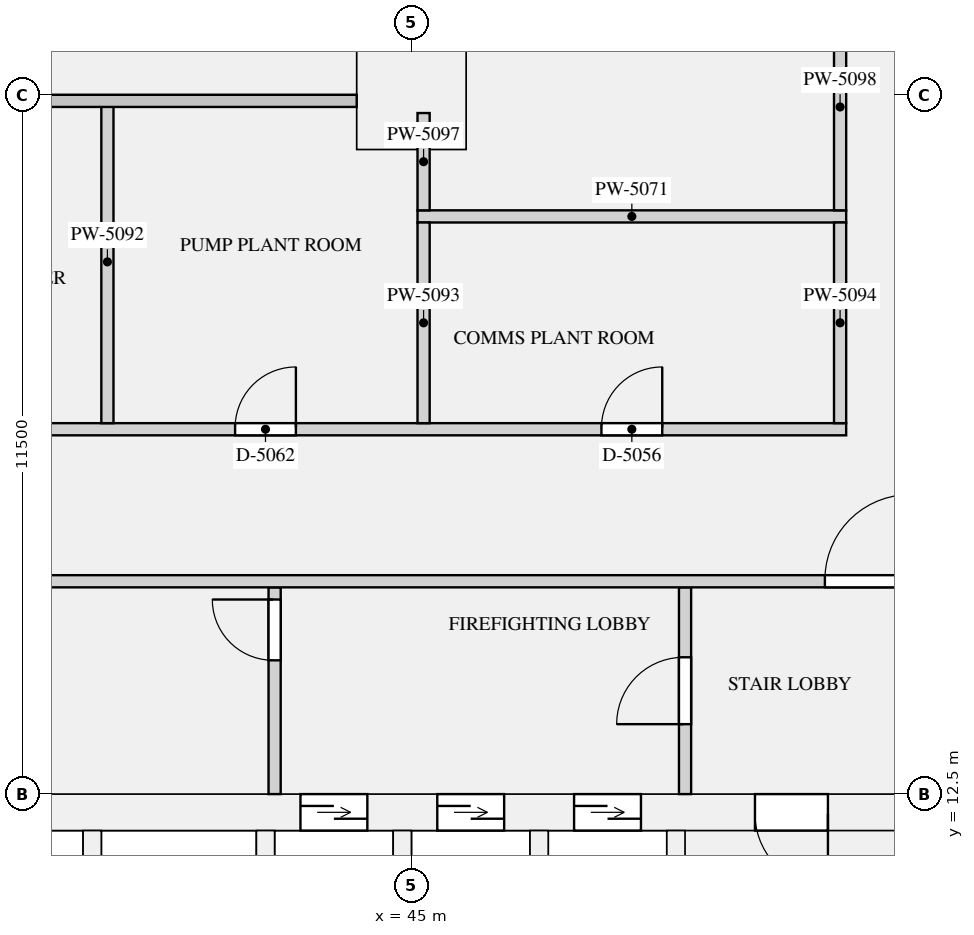
"""IFC4 building model, lengths in metres.
Left out: names, types, materials, properties, quantities, classifications, styles, units other than length and angle.
Written with IfcOpenShell. Run it as: python <this file> out.ifc"""

import sys

from ifc_helpers import new_model, si_unit, direction, frame, frame_2d, origin, origin_2d, place, context, subcontext, project, spatial, rectangle, extrude, element, fill, save


model = new_model("IFC4")
c1 = context("Model", 3, precision=1e-05, world=origin(), true_north=direction((0.0, 1.0)))
c2 = subcontext(c1, "Body", "Model", "MODEL_VIEW")
j1 = project(units=[si_unit("LENGTHUNIT", "METRE"), si_unit("PLANEANGLEUNIT", "RADIAN")], contexts=[c1])
p1 = place(None, origin())
s1 = spatial("IfcSite", under=j1, at=p1, CompositionType="ELEMENT")
p2 = place(p1, origin())
s2 = spatial("IfcBuilding", under=s1, at=p2, CompositionType="ELEMENT")
p3 = place(p2, frame((0.0, 0.0, 15.5)))
s3 = spatial("IfcBuildingStorey", under=s2, at=p3, CompositionType="ELEMENT", Elevation=15.5)
p4 = place(p3, frame((45.0, 24.0, 0.0), z_axis=(0.0, 0.0, 1.0), x_axis=(1.0, 0.0, 0.0)))
e1 = element("IfcColumn", 1, at=p4, inside=s3, PredefinedType="COLUMN", context=c2, shape_type="SweptSolid", body=[
    extrude(rectangle(XDim=1.8, YDim=1.8, at=origin_2d()), origin(), (0.0, 0.0, 1.0), 4.0),
])
p5 = place(p3, frame((19.0, 12.2, 0.0), z_axis=(0.0, 0.0, 1.0), x_axis=(1.0, 0.0, 0.0)))
e2 = element("IfcWall", 2, at=p5, inside=s3, PredefinedType="SHEAR", context=c2, shape_type="SweptSolid", body=[
    extrude(rectangle(XDim=34.0, YDim=0.6, at=frame_2d((17.0, 0.0))), origin(), (0.0, 0.0, 1.0), 4.0),
])
p6 = place(p5, frame((4.475, 0.0, 0.0)))
e3 = element("IfcOpeningElement", 3, at=p6, cuts=e2, PredefinedType="OPENING", context=c2, shape_type="SweptSolid", body=[
    extrude(rectangle(XDim=1.2, YDim=2.1, at=frame_2d((0.6, 1.05))), frame((0.0, 0.31, 0.0), z_axis=(0.0, -1.0, 0.0), x_axis=(1.0, 0.0, 0.0)), (0.0, 0.0, 1.0), 0.62),
])
p7 = place(p5, frame((7.325, 0.0, 0.0)))
e4 = element("IfcOpeningElement", 4, at=p7, cuts=e2, PredefinedType="OPENING", context=c2, shape_type="SweptSolid", body=[
    extrude(rectangle(XDim=1.2, YDim=2.1, at=frame_2d((0.6, 1.05))), frame((0.0, 0.31, 0.0), z_axis=(0.0, -1.0, 0.0), x_axis=(1.0, 0.0, 0.0)), (0.0, 0.0, 1.0), 0.62),
])
p8 = place(p5, frame((10.175, 0.0, 0.0)))
e5 = element("IfcOpeningElement", 5, at=p8, cuts=e2, PredefinedType="OPENING", context=c2, shape_type="SweptSolid", body=[
    extrude(rectangle(XDim=1.2, YDim=2.1, at=frame_2d((0.6, 1.05))), frame((0.0, 0.31, 0.0), z_axis=(0.0, -1.0, 0.0), x_axis=(1.0, 0.0, 0.0)), (0.0, 0.0, 1.0), 0.62),
])
p9 = place(p5, frame((13.025, 0.0, 0.0)))
e6 = element("IfcOpeningElement", 6, at=p9, cuts=e2, PredefinedType="OPENING", context=c2, shape_type="SweptSolid", body=[
    extrude(rectangle(XDim=1.2, YDim=2.1, at=frame_2d((0.6, 1.05))), frame((0.0, 0.31, 0.0), z_axis=(0.0, -1.0, 0.0), x_axis=(1.0, 0.0, 0.0)), (0.0, 0.0, 1.0), 0.62),
])
p10 = place(p5, frame((15.875, 0.0, 0.0)))
e7 = element("IfcOpeningElement", 7, at=p10, cuts=e2, PredefinedType="OPENING", context=c2, shape_type="SweptSolid", body=[
    extrude(rectangle(XDim=1.2, YDim=2.1, at=frame_2d((0.6, 1.05))), frame((0.0, 0.31, 0.0), z_axis=(0.0, -1.0, 0.0), x_axis=(1.0, 0.0, 0.0)), (0.0, 0.0, 1.0), 0.62),
])
p11 = place(p5, frame((24.175, 0.0, 0.0)))
e8 = element("IfcOpeningElement", 8, at=p11, cuts=e2, PredefinedType="OPENING", context=c2, shape_type="SweptSolid", body=[
    extrude(rectangle(XDim=1.1, YDim=2.1, at=frame_2d((0.55, 1.05))), frame((0.0, 0.31, 0.0), z_axis=(0.0, -1.0, 0.0), x_axis=(1.0, 0.0, 0.0)), (0.0, 0.0, 1.0), 0.62),
])
p12 = place(p5, frame((26.425, 0.0, 0.0)))
e9 = element("IfcOpeningElement", 9, at=p12, cuts=e2, PredefinedType="OPENING", context=c2, shape_type="SweptSolid", body=[
    extrude(rectangle(XDim=1.1, YDim=2.1, at=frame_2d((0.55, 1.05))), frame((0.0, 0.31, 0.0), z_axis=(0.0, -1.0, 0.0), x_axis=(1.0, 0.0, 0.0)), (0.0, 0.0, 1.0), 0.62),
])
p13 = place(p5, frame((28.675, 0.0, 0.0)))
e10 = element("IfcOpeningElement", 10, at=p13, cuts=e2, PredefinedType="OPENING", context=c2, shape_type="SweptSolid", body=[
    extrude(rectangle(XDim=1.1, YDim=2.1, at=frame_2d((0.55, 1.05))), frame((0.0, 0.31, 0.0), z_axis=(0.0, -1.0, 0.0), x_axis=(1.0, 0.0, 0.0)), (0.0, 0.0, 1.0), 0.62),
])
p14 = place(p5, frame((1.15, 0.0, 0.0)))
e11 = element("IfcOpeningElement", 11, at=p14, cuts=e2, PredefinedType="OPENING", context=c2, shape_type="SweptSolid", body=[
    extrude(rectangle(XDim=1.2, YDim=2.1, at=frame_2d((0.6, 1.05))), frame((0.0, 0.31, 0.0), z_axis=(0.0, -1.0, 0.0), x_axis=(1.0, 0.0, 0.0)), (0.0, 0.0, 1.0), 0.62),
])
p15 = place(p5, frame((31.65, 0.0, 0.0)))
e12 = element("IfcOpeningElement", 12, at=p15, cuts=e2, PredefinedType="OPENING", context=c2, shape_type="SweptSolid", body=[
    extrude(rectangle(XDim=1.2, YDim=2.1, at=frame_2d((0.6, 1.05))), frame((0.0, 0.31, 0.0), z_axis=(0.0, -1.0, 0.0), x_axis=(1.0, 0.0, 0.0)), (0.0, 0.0, 1.0), 0.62),
])
p16 = place(p3, frame((39.75, 9.35, 0.0), z_axis=(0.0, 0.0, 1.0), x_axis=(0.0, 1.0, 0.0)))
e13 = element("IfcWall", 13, at=p16, inside=s3, PredefinedType="SHEAR", context=c2, shape_type="SweptSolid", body=[
    extrude(rectangle(XDim=2.55, YDim=0.3, at=frame_2d((1.275, 0.0))), origin(), (0.0, 0.0, 1.0), 4.0),
])
for number, where, z_axis, x_axis in (
    (14, (42.6, 8.25, 0.0), (0.0, 0.0, 1.0), (0.0, 1.0, 0.0)),
    (15, (44.85, 8.25, 0.0), (0.0, 0.0, 1.0), (0.0, 1.0, 0.0)),
    (16, (47.1, 8.25, 0.0), (0.0, 0.0, 1.0), (0.0, 1.0, 0.0)),
    (17, (49.35, 8.25, 0.0), (0.0, 0.0, 1.0), (0.0, 1.0, 0.0)),
):
    element("IfcWall", number, at=place(p3, frame(where, z_axis=z_axis, x_axis=x_axis)), inside=s3, PredefinedType="SHEAR", context=c2, shape_type="SweptSolid", body=[
        extrude(rectangle(XDim=3.65, YDim=0.3, at=frame_2d((1.825, 0.0))), origin(), (0.0, 0.0, 1.0), 4.0),
    ])
p17 = place(p3, frame((42.75, 12.5, 0.0), z_axis=(0.0, 0.0, 1.0), x_axis=(0.0, 1.0, 0.0)))
e18 = element("IfcWall", 18, at=p17, inside=s3, PredefinedType="PARTITIONING", context=c2, shape_type="SweptSolid", body=[
    extrude(rectangle(XDim=3.4, YDim=0.2, at=frame_2d((1.7, 0.0))), origin(), (0.0, 0.0, 1.0), 3.68),
])
p18 = place(p17, frame((2.2, 0.0, 0.0)))
e19 = element("IfcOpeningElement", 19, at=p18, cuts=e18, PredefinedType="OPENING", context=c2, shape_type="SweptSolid", body=[
    extrude(rectangle(XDim=1.0, YDim=2.1, at=frame_2d((0.5, 1.05))), frame((0.0, 0.11, 0.0), z_axis=(0.0, -1.0, 0.0), x_axis=(1.0, 0.0, 0.0)), (0.0, 0.0, 1.0), 0.22),
])
p19 = place(p3, frame((49.5, 12.5, 0.0), z_axis=(0.0, 0.0, 1.0), x_axis=(0.0, 1.0, 0.0)))
e20 = element("IfcWall", 20, at=p19, inside=s3, PredefinedType="PARTITIONING", context=c2, shape_type="SweptSolid", body=[
    extrude(rectangle(XDim=3.4, YDim=0.2, at=frame_2d((1.7, 0.0))), origin(), (0.0, 0.0, 1.0), 3.68),
])
p20 = place(p19, frame((1.15, 0.0, 0.0)))
e21 = element("IfcOpeningElement", 21, at=p20, cuts=e20, PredefinedType="OPENING", context=c2, shape_type="SweptSolid", body=[
    extrude(rectangle(XDim=1.1, YDim=2.1, at=frame_2d((0.55, 1.05))), frame((0.0, 0.11, 0.0), z_axis=(0.0, -1.0, 0.0), x_axis=(1.0, 0.0, 0.0)), (0.0, 0.0, 1.0), 0.22),
])
p21 = place(p3, frame((17.9, 16.0, 0.0), z_axis=(0.0, 0.0, 1.0), x_axis=(1.0, 0.0, 0.0)))
e22 = element("IfcWall", 22, at=p21, inside=s3, PredefinedType="PARTITIONING", context=c2, shape_type="SweptSolid", body=[
    extrude(rectangle(XDim=36.2, YDim=0.2, at=frame_2d((18.1, 0.0))), origin(), (0.0, 0.0, 1.0), 3.68),
])
p22 = place(p21, frame((0.9, 0.0, 0.0)))
e23 = element("IfcOpeningElement", 23, at=p22, cuts=e22, PredefinedType="OPENING", context=c2, shape_type="SweptSolid", body=[
    extrude(rectangle(XDim=1.4, YDim=2.1, at=frame_2d((0.7, 1.05))), frame((0.0, 0.11, 0.0), z_axis=(0.0, -1.0, 0.0), x_axis=(1.0, 0.0, 0.0)), (0.0, 0.0, 1.0), 0.22),
])
p23 = place(p21, frame((33.9, 0.0, 0.0)))
e24 = element("IfcOpeningElement", 24, at=p23, cuts=e22, PredefinedType="OPENING", context=c2, shape_type="SweptSolid", body=[
    extrude(rectangle(XDim=1.4, YDim=2.1, at=frame_2d((0.7, 1.05))), frame((0.0, 0.11, 0.0), z_axis=(0.0, -1.0, 0.0), x_axis=(1.0, 0.0, 0.0)), (0.0, 0.0, 1.0), 0.22),
])
p24 = place(p3, frame((26.7, 18.5, 0.0), z_axis=(0.0, 0.0, 1.0), x_axis=(1.0, 0.0, 0.0)))
e25 = element("IfcWall", 25, at=p24, inside=s3, PredefinedType="PARTITIONING", context=c2, shape_type="SweptSolid", body=[
    extrude(rectangle(XDim=25.45, YDim=0.2, at=frame_2d((12.725, 0.0))), origin(), (0.0, 0.0, 1.0), 3.68),
])
p25 = place(p24, frame((21.425, 0.0, 0.0)))
e26 = element("IfcOpeningElement", 26, at=p25, cuts=e25, PredefinedType="OPENING", context=c2, shape_type="SweptSolid", body=[
    extrude(rectangle(XDim=1.0, YDim=2.1, at=frame_2d((0.5, 1.05))), frame((0.0, 0.11, 0.0), z_axis=(0.0, -1.0, 0.0), x_axis=(1.0, 0.0, 0.0)), (0.0, 0.0, 1.0), 0.22),
])
p26 = place(p24, frame((3.45, 0.0, 0.0)))
e27 = element("IfcOpeningElement", 27, at=p26, cuts=e25, PredefinedType="OPENING", context=c2, shape_type="SweptSolid", body=[
    extrude(rectangle(XDim=1.0, YDim=2.1, at=frame_2d((0.5, 1.05))), frame((0.0, 0.11, 0.0), z_axis=(0.0, -1.0, 0.0), x_axis=(1.0, 0.0, 0.0)), (0.0, 0.0, 1.0), 0.22),
])
p27 = place(p24, frame((10.05, 0.0, 0.0)))
e28 = element("IfcOpeningElement", 28, at=p27, cuts=e25, PredefinedType="OPENING", context=c2, shape_type="SweptSolid", body=[
    extrude(rectangle(XDim=1.0, YDim=2.1, at=frame_2d((0.5, 1.05))), frame((0.0, 0.11, 0.0), z_axis=(0.0, -1.0, 0.0), x_axis=(1.0, 0.0, 0.0)), (0.0, 0.0, 1.0), 0.22),
])
p28 = place(p24, frame((15.4, 0.0, 0.0)))
e29 = element("IfcOpeningElement", 29, at=p28, cuts=e25, PredefinedType="OPENING", context=c2, shape_type="SweptSolid", body=[
    extrude(rectangle(XDim=1.0, YDim=2.1, at=frame_2d((0.5, 1.05))), frame((0.0, 0.11, 0.0), z_axis=(0.0, -1.0, 0.0), x_axis=(1.0, 0.0, 0.0)), (0.0, 0.0, 1.0), 0.22),
])
p29 = place(p3, frame((45.1, 22.0, 0.0), z_axis=(0.0, 0.0, 1.0), x_axis=(1.0, 0.0, 0.0)))
e30 = element("IfcWall", 30, at=p29, inside=s3, PredefinedType="PARTITIONING", context=c2, shape_type="SweptSolid", body=[
    extrude(rectangle(XDim=7.05, YDim=0.2, at=frame_2d((3.525, 0.0))), origin(), (0.0, 0.0, 1.0), 3.68),
])
p30 = place(p3, frame((40.0, 18.6, 0.0), z_axis=(0.0, 0.0, 1.0), x_axis=(0.0, 1.0, 0.0)))
e31 = element("IfcWall", 31, at=p30, inside=s3, PredefinedType="PARTITIONING", context=c2, shape_type="SweptSolid", body=[
    extrude(rectangle(XDim=5.304, YDim=0.2, at=frame_2d((2.652, 0.0))), origin(), (0.0, 0.0, 1.0), 3.68),
])
for number, where, z_axis, x_axis in (
    (32, (45.2, 18.6, 0.0), (0.0, 0.0, 1.0), (0.0, 1.0, 0.0)),
    (33, (52.05, 18.6, 0.0), (0.0, 0.0, 1.0), (0.0, 1.0, 0.0)),
):
    element("IfcWall", number, at=place(p3, frame(where, z_axis=z_axis, x_axis=x_axis)), inside=s3, PredefinedType="PARTITIONING", context=c2, shape_type="SweptSolid", body=[
        extrude(rectangle(XDim=3.3, YDim=0.2, at=frame_2d((1.65, 0.0))), origin(), (0.0, 0.0, 1.0), 3.68),
    ])
p31 = place(p3, frame((45.2, 22.1, 0.0), z_axis=(0.0, 0.0, 1.0), x_axis=(0.0, 1.0, 0.0)))
e34 = element("IfcWall", 34, at=p31, inside=s3, PredefinedType="PARTITIONING", context=c2, shape_type="SweptSolid", body=[
    extrude(rectangle(XDim=1.6, YDim=0.2, at=frame_2d((0.8, 0.0))), origin(), (0.0, 0.0, 1.0), 3.68),
])
p32 = place(p3, frame((52.05, 22.1, 0.0), z_axis=(0.0, 0.0, 1.0), x_axis=(0.0, 1.0, 0.0)))
e35 = element("IfcWall", 35, at=p32, inside=s3, PredefinedType="PARTITIONING", context=c2, shape_type="SweptSolid", body=[
    extrude(rectangle(XDim=4.8, YDim=0.2, at=frame_2d((2.4, 0.0))), origin(), (0.0, 0.0, 1.0), 3.68),
])
p33 = place(p32, frame((3.4, 0.0, 0.0)))
e36 = element("IfcOpeningElement", 36, at=p33, cuts=e35, PredefinedType="OPENING", context=c2, shape_type="SweptSolid", body=[
    extrude(rectangle(XDim=1.0, YDim=2.1, at=frame_2d((0.5, 1.05))), frame((0.0, 0.11, 0.0), z_axis=(0.0, -1.0, 0.0), x_axis=(1.0, 0.0, 0.0)), (0.0, 0.0, 1.0), 0.22),
])
p34 = place(p11, origin())
e37 = element("IfcDoor", 37, at=p34, inside=s3, OperationType="DOUBLE_DOOR_SLIDING", PredefinedType="DOOR", context=c2, shape_type="SweptSolid", body=[
    extrude(rectangle(XDim=1.1, YDim=2.1, at=frame_2d((0.55, 1.05))), frame((0.0, 0.025, 0.0), z_axis=(0.0, -1.0, 0.0), x_axis=(1.0, 0.0, 0.0)), (0.0, 0.0, 1.0), 0.05),
])
fill(e8, e37)
p35 = place(p12, origin())
e38 = element("IfcDoor", 38, at=p35, inside=s3, OperationType="DOUBLE_DOOR_SLIDING", PredefinedType="DOOR", context=c2, shape_type="SweptSolid", body=[
    extrude(rectangle(XDim=1.1, YDim=2.1, at=frame_2d((0.55, 1.05))), frame((0.0, 0.025, 0.0), z_axis=(0.0, -1.0, 0.0), x_axis=(1.0, 0.0, 0.0)), (0.0, 0.0, 1.0), 0.05),
])
fill(e9, e38)
p36 = place(p13, origin())
e39 = element("IfcDoor", 39, at=p36, inside=s3, OperationType="DOUBLE_DOOR_SLIDING", PredefinedType="DOOR", context=c2, shape_type="SweptSolid", body=[
    extrude(rectangle(XDim=1.1, YDim=2.1, at=frame_2d((0.55, 1.05))), frame((0.0, 0.025, 0.0), z_axis=(0.0, -1.0, 0.0), x_axis=(1.0, 0.0, 0.0)), (0.0, 0.0, 1.0), 0.05),
])
fill(e10, e39)
p37 = place(p15, frame((1.2, 0.0, 0.0), z_axis=(0.0, 0.0, 1.0), x_axis=(-1.0, 0.0, 0.0)))
e40 = element("IfcDoor", 40, at=p37, inside=s3, OperationType="SINGLE_SWING_LEFT", PredefinedType="DOOR", context=c2, shape_type="SweptSolid", body=[
    extrude(rectangle(XDim=1.2, YDim=2.1, at=frame_2d((0.6, 1.05))), frame((0.0, 0.025, 0.0), z_axis=(0.0, -1.0, 0.0), x_axis=(1.0, 0.0, 0.0)), (0.0, 0.0, 1.0), 0.05),
])
fill(e12, e40)
p38 = place(p18, origin())
e41 = element("IfcDoor", 41, at=p38, inside=s3, OperationType="SINGLE_SWING_RIGHT", PredefinedType="DOOR", context=c2, shape_type="SweptSolid", body=[
    extrude(rectangle(XDim=1.0, YDim=2.1, at=frame_2d((0.5, 1.05))), frame((0.0, 0.025, 0.0), z_axis=(0.0, -1.0, 0.0), x_axis=(1.0, 0.0, 0.0)), (0.0, 0.0, 1.0), 0.05),
])
fill(e19, e41)
p39 = place(p20, origin())
e42 = element("IfcDoor", 42, at=p39, inside=s3, OperationType="SINGLE_SWING_LEFT", PredefinedType="DOOR", context=c2, shape_type="SweptSolid", body=[
    extrude(rectangle(XDim=1.1, YDim=2.1, at=frame_2d((0.55, 1.05))), frame((0.0, 0.025, 0.0), z_axis=(0.0, -1.0, 0.0), x_axis=(1.0, 0.0, 0.0)), (0.0, 0.0, 1.0), 0.05),
])
fill(e21, e42)
p40 = place(p23, origin())
e43 = element("IfcDoor", 43, at=p40, inside=s3, OperationType="SINGLE_SWING_RIGHT", PredefinedType="DOOR", context=c2, shape_type="SweptSolid", body=[
    extrude(rectangle(XDim=1.4, YDim=2.1, at=frame_2d((0.7, 1.05))), frame((0.0, 0.025, 0.0), z_axis=(0.0, -1.0, 0.0), x_axis=(1.0, 0.0, 0.0)), (0.0, 0.0, 1.0), 0.05),
])
fill(e24, e43)
p41 = place(p25, origin())
e44 = element("IfcDoor", 44, at=p41, inside=s3, OperationType="SINGLE_SWING_RIGHT", PredefinedType="DOOR", context=c2, shape_type="SweptSolid", body=[
    extrude(rectangle(XDim=1.0, YDim=2.1, at=frame_2d((0.5, 1.05))), frame((0.0, 0.025, 0.0), z_axis=(0.0, -1.0, 0.0), x_axis=(1.0, 0.0, 0.0)), (0.0, 0.0, 1.0), 0.05),
])
fill(e26, e44)
p42 = place(p28, origin())
e45 = element("IfcDoor", 45, at=p42, inside=s3, OperationType="SINGLE_SWING_RIGHT", PredefinedType="DOOR", context=c2, shape_type="SweptSolid", body=[
    extrude(rectangle(XDim=1.0, YDim=2.1, at=frame_2d((0.5, 1.05))), frame((0.0, 0.025, 0.0), z_axis=(0.0, -1.0, 0.0), x_axis=(1.0, 0.0, 0.0)), (0.0, 0.0, 1.0), 0.05),
])
fill(e29, e45)
save(model, sys.argv[1])
